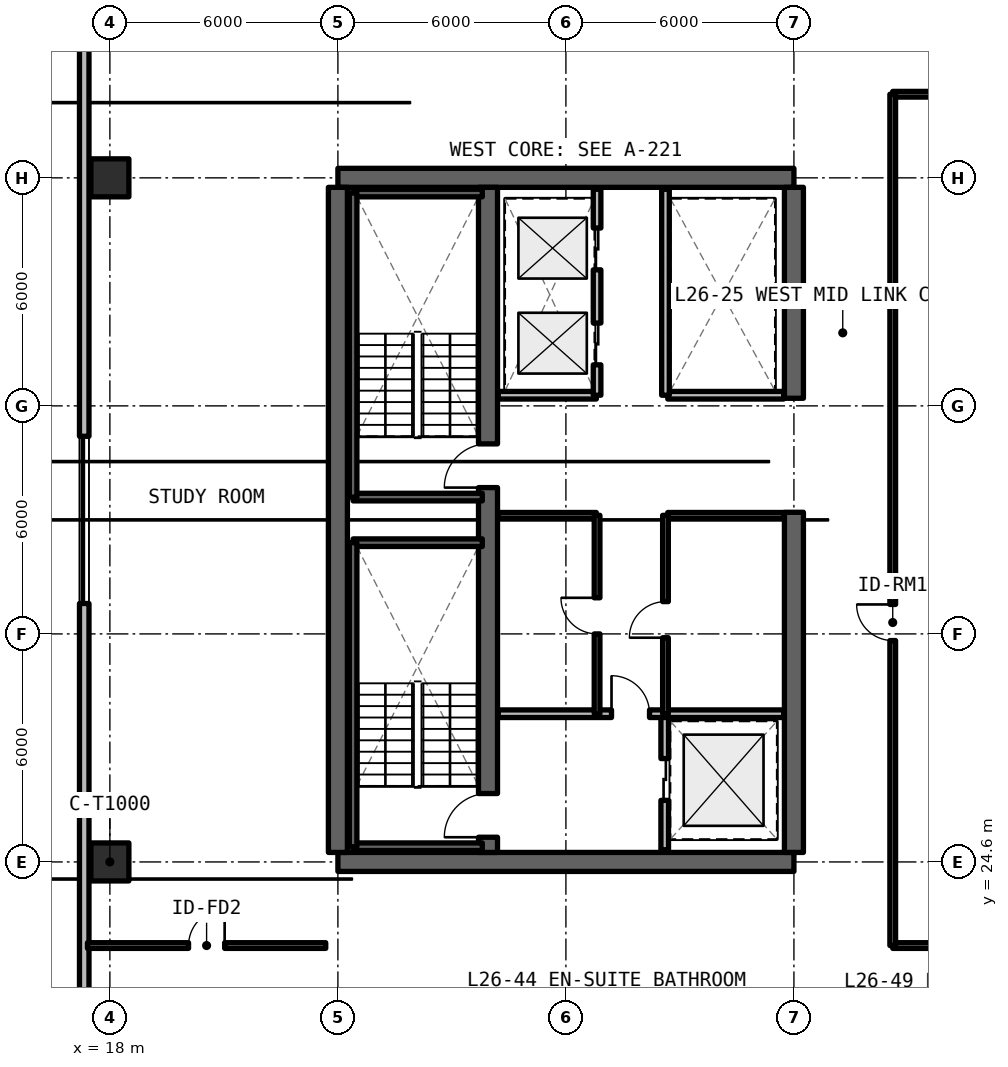
"""IFC4 building model, lengths in metres.
Left out: names, types, materials, properties, quantities, classifications, styles, units other than length and angle.
Written with IfcOpenShell. Run it as: python <this file> out.ifc"""

import sys

from ifc_helpers import new_model, si_unit, direction, frame, frame_2d, origin, origin_2d, place, context, subcontext, project, spatial, rectangle, extrude, element, fill, save


model = new_model("IFC4")
c1 = context("Model", 3, precision=1e-05, world=origin(), true_north=direction((0.0, 1.0)))
c2 = subcontext(c1, "Body", "Model", "MODEL_VIEW")
j1 = project(units=[si_unit("LENGTHUNIT", "METRE"), si_unit("PLANEANGLEUNIT", "RADIAN")], contexts=[c1])
p1 = place(None, origin())
s1 = spatial("IfcSite", under=j1, at=p1, CompositionType="ELEMENT")
p2 = place(p1, origin())
s2 = spatial("IfcBuilding", under=s1, at=p2, CompositionType="ELEMENT")
p3 = place(p2, frame((0.0, 0.0, 95.37)))
s3 = spatial("IfcBuildingStorey", under=s2, at=p3, CompositionType="ELEMENT", Elevation=95.37)
for number, where, z_axis, x_axis in (
    (1, (24.0, 24.6, 0.0), (0.0, 0.0, 1.0), (1.0, 0.0, 0.0)),
    (2, (36.0, 42.6, 0.0), (0.0, 0.0, 1.0), (-1.0, 0.0, 0.0)),
):
    element("IfcWall", number, at=place(p3, frame(where, z_axis=z_axis, x_axis=x_axis)), inside=s3, PredefinedType="SHEAR", context=c2, shape_type="SweptSolid", body=[
        extrude(rectangle(XDim=12.0, YDim=0.5, at=frame_2d((6.0, 0.0))), origin(), (0.0, 0.0, 1.0), 3.3),
    ])
p4 = place(p3, frame((24.0, 24.85, 0.0), z_axis=(0.0, 0.0, 1.0), x_axis=(0.0, 1.0, 0.0)))
e3 = element("IfcWall", 3, at=p4, inside=s3, PredefinedType="SHEAR", context=c2, shape_type="SweptSolid", body=[
    extrude(rectangle(XDim=17.5, YDim=0.5, at=frame_2d((8.75, 0.0))), origin(), (0.0, 0.0, 1.0), 3.3),
])
p5 = place(p3, frame((36.0, 24.85, 0.0), z_axis=(0.0, 0.0, 1.0), x_axis=(0.0, 1.0, 0.0)))
e4 = element("IfcWall", 4, at=p5, inside=s3, PredefinedType="SHEAR", context=c2, shape_type="SweptSolid", body=[
    extrude(rectangle(XDim=8.95, YDim=0.5, at=frame_2d((4.475, 0.0))), origin(), (0.0, 0.0, 1.0), 3.3),
])
p6 = place(p3, frame((36.0, 36.8, 0.0), z_axis=(0.0, 0.0, 1.0), x_axis=(0.0, 1.0, 0.0)))
e5 = element("IfcWall", 5, at=p6, inside=s3, PredefinedType="SHEAR", context=c2, shape_type="SweptSolid", body=[
    extrude(rectangle(XDim=5.55, YDim=0.5, at=frame_2d((2.775, 0.0))), origin(), (0.0, 0.0, 1.0), 3.3),
])
p7 = place(p3, frame((27.95, 24.85, 0.0), z_axis=(0.0, 0.0, 1.0), x_axis=(0.0, 1.0, 0.0)))
e6 = element("IfcWall", 6, at=p7, inside=s3, PredefinedType="SHEAR", context=c2, shape_type="SweptSolid", body=[
    extrude(rectangle(XDim=17.5, YDim=0.5, at=frame_2d((8.75, 0.0))), origin(), (0.0, 0.0, 1.0), 3.3),
])
p8 = place(p7, frame((0.4, 0.0, 0.0)))
e7 = element("IfcOpeningElement", 7, at=p8, cuts=e6, PredefinedType="OPENING", context=c2, shape_type="SweptSolid", body=[
    extrude(rectangle(XDim=1.15, YDim=2.15, at=frame_2d((0.575, 1.075))), frame((0.0, 0.26, 0.0), z_axis=(0.0, -1.0, 0.0), x_axis=(1.0, 0.0, 0.0)), (0.0, 0.0, 1.0), 0.52),
])
p9 = place(p7, frame((9.6, 0.0, 0.0)))
e8 = element("IfcOpeningElement", 8, at=p9, cuts=e6, PredefinedType="OPENING", context=c2, shape_type="SweptSolid", body=[
    extrude(rectangle(XDim=1.15, YDim=2.15, at=frame_2d((0.575, 1.075))), frame((0.0, 0.26, 0.0), z_axis=(0.0, -1.0, 0.0), x_axis=(1.0, 0.0, 0.0)), (0.0, 0.0, 1.0), 0.52),
])
for number, where, z_axis, x_axis in (
    (9, (18.0, 24.6, 0.0), (0.0, 0.0, 1.0), (1.0, 0.0, 0.0)),
    (10, (18.0, 42.6, 0.0), (0.0, 0.0, 1.0), (1.0, 0.0, 0.0)),
):
    element("IfcColumn", number, at=place(p3, frame(where, z_axis=z_axis, x_axis=x_axis)), inside=s3, PredefinedType="COLUMN", context=c2, shape_type="SweptSolid", body=[
        extrude(rectangle(XDim=1.0, YDim=1.0, at=origin_2d()), origin(), (0.0, 0.0, 1.0), 3.3),
    ])
p10 = place(p3, frame((17.325, 53.348, 0.0), z_axis=(0.0, 0.0, 1.0), x_axis=(0.0, -1.0, 0.0)))
e11 = element("IfcWall", 11, at=p10, inside=s3, PredefinedType="SOLIDWALL", context=c2, shape_type="SweptSolid", body=[
    extrude(rectangle(XDim=39.496, YDim=0.25, at=frame_2d((19.748, 0.0))), origin(), (0.0, 0.0, 1.0), 3.08),
])
p11 = place(p10, frame((36.448, 0.0, 0.0)))
e12 = element("IfcOpeningElement", 12, at=p11, cuts=e11, PredefinedType="OPENING", context=c2, shape_type="SweptSolid", body=[
    extrude(rectangle(XDim=1.1, YDim=2.15, at=frame_2d((0.55, 1.075))), frame((0.0, 0.135, 0.0), z_axis=(0.0, -1.0, 0.0), x_axis=(1.0, 0.0, 0.0)), (0.0, 0.0, 1.0), 0.27),
])
p12 = place(p10, frame((17.548, 0.0, 0.78)))
e13 = element("IfcOpeningElement", 13, at=p12, cuts=e11, PredefinedType="OPENING", context=c2, shape_type="SweptSolid", body=[
    extrude(rectangle(XDim=4.4, YDim=1.66, at=frame_2d((2.2, 0.83))), frame((0.0, 0.135, 0.0), z_axis=(0.0, -1.0, 0.0), x_axis=(1.0, 0.0, 0.0)), (0.0, 0.0, 1.0), 0.27),
])
p13 = place(p3, frame((32.6, 24.92, 0.0), z_axis=(0.0, 0.0, 1.0), x_axis=(0.0, 1.0, 0.0)))
e14 = element("IfcWall", 14, at=p13, inside=s3, PredefinedType="SOLIDWALL", context=c2, shape_type="SweptSolid", body=[
    extrude(rectangle(XDim=3.58, YDim=0.2, at=frame_2d((1.79, 0.0))), origin(), (0.0, 0.0, 1.0), 2.35),
])
p14 = place(p13, frame((1.3, 0.0, 0.0)))
e15 = element("IfcOpeningElement", 15, at=p14, cuts=e14, PredefinedType="OPENING", context=c2, shape_type="SweptSolid", body=[
    extrude(rectangle(XDim=1.1, YDim=2.2, at=frame_2d((0.55, 1.1))), frame((0.0, 0.11, 0.0), z_axis=(0.0, -1.0, 0.0), x_axis=(1.0, 0.0, 0.0)), (0.0, 0.0, 1.0), 0.22),
])
p15 = place(p3, frame((28.22, 28.5, 0.0), z_axis=(0.0, 0.0, 1.0), x_axis=(1.0, 0.0, 0.0)))
e16 = element("IfcWall", 16, at=p15, inside=s3, PredefinedType="SOLIDWALL", context=c2, shape_type="SweptSolid", body=[
    extrude(rectangle(XDim=7.51, YDim=0.2, at=frame_2d((3.755, 0.0))), origin(), (0.0, 0.0, 1.0), 2.35),
])
p16 = place(p15, frame((2.98, 0.0, 0.0)))
e17 = element("IfcOpeningElement", 17, at=p16, cuts=e16, PredefinedType="OPENING", context=c2, shape_type="SweptSolid", body=[
    extrude(rectangle(XDim=1.0, YDim=2.15, at=frame_2d((0.5, 1.075))), frame((0.0, 0.11, 0.0), z_axis=(0.0, -1.0, 0.0), x_axis=(1.0, 0.0, 0.0)), (0.0, 0.0, 1.0), 0.22),
])
p17 = place(p3, frame((28.22, 33.72, 0.0), z_axis=(0.0, 0.0, 1.0), x_axis=(1.0, 0.0, 0.0)))
e18 = element("IfcWall", 18, at=p17, inside=s3, PredefinedType="SOLIDWALL", context=c2, shape_type="SweptSolid", body=[
    extrude(rectangle(XDim=2.58, YDim=0.15, at=frame_2d((1.29, 0.0))), origin(), (0.0, 0.0, 1.0), 2.35),
])
p18 = place(p3, frame((30.82, 28.5, 0.0), z_axis=(0.0, 0.0, 1.0), x_axis=(0.0, 1.0, 0.0)))
e19 = element("IfcWall", 19, at=p18, inside=s3, PredefinedType="SOLIDWALL", context=c2, shape_type="SweptSolid", body=[
    extrude(rectangle(XDim=5.22, YDim=0.15, at=frame_2d((2.61, 0.0))), origin(), (0.0, 0.0, 1.0), 2.35),
])
p19 = place(p18, frame((2.1, 0.0, 0.0)))
e20 = element("IfcOpeningElement", 20, at=p19, cuts=e19, PredefinedType="OPENING", context=c2, shape_type="SweptSolid", body=[
    extrude(rectangle(XDim=0.95, YDim=2.15, at=frame_2d((0.475, 1.075))), frame((0.0, 0.085, 0.0), z_axis=(0.0, -1.0, 0.0), x_axis=(1.0, 0.0, 0.0)), (0.0, 0.0, 1.0), 0.17),
])
p20 = place(p3, frame((32.68, 33.72, 0.0), z_axis=(0.0, 0.0, 1.0), x_axis=(1.0, 0.0, 0.0)))
e21 = element("IfcWall", 21, at=p20, inside=s3, PredefinedType="SOLIDWALL", context=c2, shape_type="SweptSolid", body=[
    extrude(rectangle(XDim=3.05, YDim=0.15, at=frame_2d((1.525, 0.0))), origin(), (0.0, 0.0, 1.0), 2.35),
])
p21 = place(p3, frame((32.62, 28.5, 0.0), z_axis=(0.0, 0.0, 1.0), x_axis=(0.0, 1.0, 0.0)))
e22 = element("IfcWall", 22, at=p21, inside=s3, PredefinedType="SOLIDWALL", context=c2, shape_type="SweptSolid", body=[
    extrude(rectangle(XDim=5.22, YDim=0.15, at=frame_2d((2.61, 0.0))), origin(), (0.0, 0.0, 1.0), 2.35),
])
p22 = place(p21, frame((2.0, 0.0, 0.0)))
e23 = element("IfcOpeningElement", 23, at=p22, cuts=e22, PredefinedType="OPENING", context=c2, shape_type="SweptSolid", body=[
    extrude(rectangle(XDim=0.95, YDim=2.15, at=frame_2d((0.475, 1.075))), frame((0.0, 0.085, 0.0), z_axis=(0.0, -1.0, 0.0), x_axis=(1.0, 0.0, 0.0)), (0.0, 0.0, 1.0), 0.17),
])
p23 = place(p3, frame((28.22, 36.88, 0.0), z_axis=(0.0, 0.0, 1.0), x_axis=(1.0, 0.0, 0.0)))
e24 = element("IfcWall", 24, at=p23, inside=s3, PredefinedType="SOLIDWALL", context=c2, shape_type="SweptSolid", body=[
    extrude(rectangle(XDim=2.58, YDim=0.2, at=frame_2d((1.29, 0.0))), origin(), (0.0, 0.0, 1.0), 2.35),
])
p24 = place(p3, frame((30.82, 36.88, 0.0), z_axis=(0.0, 0.0, 1.0), x_axis=(0.0, 1.0, 0.0)))
e25 = element("IfcWall", 25, at=p24, inside=s3, PredefinedType="SOLIDWALL", context=c2, shape_type="SweptSolid", body=[
    extrude(rectangle(XDim=5.42, YDim=0.2, at=frame_2d((2.71, 0.0))), origin(), (0.0, 0.0, 1.0), 2.35),
])
p25 = place(p24, frame((0.8, 0.0, 0.0)))
e26 = element("IfcOpeningElement", 26, at=p25, cuts=e25, PredefinedType="OPENING", context=c2, shape_type="SweptSolid", body=[
    extrude(rectangle(XDim=1.1, YDim=2.2, at=frame_2d((0.55, 1.1))), frame((0.0, 0.11, 0.0), z_axis=(0.0, -1.0, 0.0), x_axis=(1.0, 0.0, 0.0)), (0.0, 0.0, 1.0), 0.22),
])
p26 = place(p24, frame((3.3, 0.0, 0.0)))
e27 = element("IfcOpeningElement", 27, at=p26, cuts=e25, PredefinedType="OPENING", context=c2, shape_type="SweptSolid", body=[
    extrude(rectangle(XDim=1.1, YDim=2.2, at=frame_2d((0.55, 1.1))), frame((0.0, 0.11, 0.0), z_axis=(0.0, -1.0, 0.0), x_axis=(1.0, 0.0, 0.0)), (0.0, 0.0, 1.0), 0.22),
])
p27 = place(p3, frame((32.68, 36.88, 0.0), z_axis=(0.0, 0.0, 1.0), x_axis=(1.0, 0.0, 0.0)))
e28 = element("IfcWall", 28, at=p27, inside=s3, PredefinedType="SOLIDWALL", context=c2, shape_type="SweptSolid", body=[
    extrude(rectangle(XDim=3.05, YDim=0.2, at=frame_2d((1.525, 0.0))), origin(), (0.0, 0.0, 1.0), 2.35),
])
p28 = place(p3, frame((32.62, 36.88, 0.0), z_axis=(0.0, 0.0, 1.0), x_axis=(0.0, 1.0, 0.0)))
e29 = element("IfcWall", 29, at=p28, inside=s3, PredefinedType="SOLIDWALL", context=c2, shape_type="SweptSolid", body=[
    extrude(rectangle(XDim=5.42, YDim=0.2, at=frame_2d((2.71, 0.0))), origin(), (0.0, 0.0, 1.0), 2.35),
])
for number, where, z_axis, x_axis in (
    (30, (38.6, 22.4, 0.0), (0.0, 0.0, 1.0), (1.0, 0.0, 0.0)),
    (31, (38.6, 44.8, 0.0), (0.0, 0.0, 1.0), (1.0, 0.0, 0.0)),
):
    element("IfcWall", number, at=place(p3, frame(where, z_axis=z_axis, x_axis=x_axis)), inside=s3, PredefinedType="SOLIDWALL", context=c2, shape_type="SweptSolid", body=[
        extrude(rectangle(XDim=8.25, YDim=0.15, at=frame_2d((4.125, 0.0))), origin(), (0.0, 0.0, 1.0), 2.35),
    ])
p29 = place(p3, frame((38.6, 22.4, 0.0), z_axis=(0.0, 0.0, 1.0), x_axis=(0.0, 1.0, 0.0)))
e32 = element("IfcWall", 32, at=p29, inside=s3, PredefinedType="SOLIDWALL", context=c2, shape_type="SweptSolid", body=[
    extrude(rectangle(XDim=22.4, YDim=0.15, at=frame_2d((11.2, 0.0))), origin(), (0.0, 0.0, 1.0), 2.35),
])
p30 = place(p29, frame((8.025, 0.0, 0.0)))
e33 = element("IfcOpeningElement", 33, at=p30, cuts=e32, PredefinedType="OPENING", context=c2, shape_type="SweptSolid", body=[
    extrude(rectangle(XDim=0.95, YDim=2.15, at=frame_2d((0.475, 1.075))), frame((0.0, 0.085, 0.0), z_axis=(0.0, -1.0, 0.0), x_axis=(1.0, 0.0, 0.0)), (0.0, 0.0, 1.0), 0.17),
])
p31 = place(p3, frame((17.41, 22.4, 0.0), z_axis=(0.0, 0.0, 1.0), x_axis=(1.0, 0.0, 0.0)))
e34 = element("IfcWall", 34, at=p31, inside=s3, PredefinedType="SOLIDWALL", context=c2, shape_type="SweptSolid", body=[
    extrude(rectangle(XDim=6.27, YDim=0.15, at=frame_2d((3.135, 0.0))), origin(), (0.0, 0.0, 1.0), 2.35),
])
p32 = place(p31, frame((2.66, 0.0, 0.0)))
e35 = element("IfcOpeningElement", 35, at=p32, cuts=e34, PredefinedType="OPENING", context=c2, shape_type="SweptSolid", body=[
    extrude(rectangle(XDim=0.95, YDim=2.15, at=frame_2d((0.475, 1.075))), frame((0.0, 0.085, 0.0), z_axis=(0.0, -1.0, 0.0), x_axis=(1.0, 0.0, 0.0)), (0.0, 0.0, 1.0), 0.17),
])
for number, where, z_axis, x_axis in (
    (36, (24.4, 25.0, 0.0), (0.0, 0.0, 1.0), (1.0, 0.0, 0.0)),
    (37, (27.8, 33.0, 0.0), (0.0, 0.0, 1.0), (-1.0, 0.0, 0.0)),
):
    element("IfcWall", number, at=place(p3, frame(where, z_axis=z_axis, x_axis=x_axis)), inside=s3, PredefinedType="SOLIDWALL", context=c2, shape_type="SweptSolid", body=[
        extrude(rectangle(XDim=3.4, YDim=0.2, at=frame_2d((1.7, 0.0))), origin(), (0.0, 0.0, 1.0), 3.3),
    ])
p33 = place(p3, frame((24.4, 33.0, 0.0), z_axis=(0.0, 0.0, 1.0), x_axis=(0.0, -1.0, 0.0)))
e38 = element("IfcWall", 38, at=p33, inside=s3, PredefinedType="SOLIDWALL", context=c2, shape_type="SweptSolid", body=[
    extrude(rectangle(XDim=8.0, YDim=0.2, at=frame_2d((4.0, 0.0))), origin(), (0.0, 0.0, 1.0), 3.3),
])
for number, where, z_axis, x_axis in (
    (39, (24.4, 34.2, 0.0), (0.0, 0.0, 1.0), (1.0, 0.0, 0.0)),
    (40, (27.8, 42.2, 0.0), (0.0, 0.0, 1.0), (-1.0, 0.0, 0.0)),
):
    element("IfcWall", number, at=place(p3, frame(where, z_axis=z_axis, x_axis=x_axis)), inside=s3, PredefinedType="SOLIDWALL", context=c2, shape_type="SweptSolid", body=[
        extrude(rectangle(XDim=3.4, YDim=0.2, at=frame_2d((1.7, 0.0))), origin(), (0.0, 0.0, 1.0), 3.3),
    ])
p34 = place(p3, frame((24.4, 42.2, 0.0), z_axis=(0.0, 0.0, 1.0), x_axis=(0.0, -1.0, 0.0)))
e41 = element("IfcWall", 41, at=p34, inside=s3, PredefinedType="SOLIDWALL", context=c2, shape_type="SweptSolid", body=[
    extrude(rectangle(XDim=8.0, YDim=0.2, at=frame_2d((4.0, 0.0))), origin(), (0.0, 0.0, 1.0), 3.3),
])
p35 = place(p12, origin())
e42 = element("IfcWindow", 42, at=p35, inside=s3, PartitioningType="SINGLE_PANEL", PredefinedType="WINDOW", context=c2, shape_type="SweptSolid", body=[
    extrude(rectangle(XDim=4.4, YDim=1.66, at=frame_2d((2.2, 0.83))), frame((0.0, 0.03, 0.0), z_axis=(0.0, -1.0, 0.0), x_axis=(1.0, 0.0, 0.0)), (0.0, 0.0, 1.0), 0.06),
])
fill(e13, e42)
p36 = place(p14, origin())
e43 = element("IfcDoor", 43, at=p36, inside=s3, OperationType="SLIDING_TO_LEFT", PredefinedType="DOOR", context=c2, shape_type="SweptSolid", body=[
    extrude(rectangle(XDim=1.1, YDim=2.2, at=frame_2d((0.55, 1.1))), frame((0.0, 0.025, 0.0), z_axis=(0.0, -1.0, 0.0), x_axis=(1.0, 0.0, 0.0)), (0.0, 0.0, 1.0), 0.05),
])
fill(e15, e43)
p37 = place(p16, origin())
e44 = element("IfcDoor", 44, at=p37, inside=s3, OperationType="SINGLE_SWING_LEFT", PredefinedType="DOOR", context=c2, shape_type="SweptSolid", body=[
    extrude(rectangle(XDim=1.0, YDim=2.15, at=frame_2d((0.5, 1.075))), frame((0.0, 0.025, 0.0), z_axis=(0.0, -1.0, 0.0), x_axis=(1.0, 0.0, 0.0)), (0.0, 0.0, 1.0), 0.05),
])
fill(e17, e44)
p38 = place(p19, origin())
e45 = element("IfcDoor", 45, at=p38, inside=s3, OperationType="SINGLE_SWING_RIGHT", PredefinedType="DOOR", context=c2, shape_type="SweptSolid", body=[
    extrude(rectangle(XDim=0.95, YDim=2.15, at=frame_2d((0.475, 1.075))), frame((0.0, 0.025, 0.0), z_axis=(0.0, -1.0, 0.0), x_axis=(1.0, 0.0, 0.0)), (0.0, 0.0, 1.0), 0.05),
])
fill(e20, e45)
p39 = place(p22, origin())
e46 = element("IfcDoor", 46, at=p39, inside=s3, OperationType="SINGLE_SWING_LEFT", PredefinedType="DOOR", context=c2, shape_type="SweptSolid", body=[
    extrude(rectangle(XDim=0.95, YDim=2.15, at=frame_2d((0.475, 1.075))), frame((0.0, 0.025, 0.0), z_axis=(0.0, -1.0, 0.0), x_axis=(1.0, 0.0, 0.0)), (0.0, 0.0, 1.0), 0.05),
])
fill(e23, e46)
p40 = place(p25, origin())
e47 = element("IfcDoor", 47, at=p40, inside=s3, OperationType="SLIDING_TO_LEFT", PredefinedType="DOOR", context=c2, shape_type="SweptSolid", body=[
    extrude(rectangle(XDim=1.1, YDim=2.2, at=frame_2d((0.55, 1.1))), frame((0.0, 0.025, 0.0), z_axis=(0.0, -1.0, 0.0), x_axis=(1.0, 0.0, 0.0)), (0.0, 0.0, 1.0), 0.05),
])
fill(e26, e47)
p41 = place(p26, origin())
e48 = element("IfcDoor", 48, at=p41, inside=s3, OperationType="SLIDING_TO_RIGHT", PredefinedType="DOOR", context=c2, shape_type="SweptSolid", body=[
    extrude(rectangle(XDim=1.1, YDim=2.2, at=frame_2d((0.55, 1.1))), frame((0.0, 0.025, 0.0), z_axis=(0.0, -1.0, 0.0), x_axis=(1.0, 0.0, 0.0)), (0.0, 0.0, 1.0), 0.05),
])
fill(e27, e48)
p42 = place(p30, origin())
e49 = element("IfcDoor", 49, at=p42, inside=s3, OperationType="SINGLE_SWING_RIGHT", PredefinedType="DOOR", context=c2, shape_type="SweptSolid", body=[
    extrude(rectangle(XDim=0.95, YDim=2.15, at=frame_2d((0.475, 1.075))), frame((0.0, 0.025, 0.0), z_axis=(0.0, -1.0, 0.0), x_axis=(1.0, 0.0, 0.0)), (0.0, 0.0, 1.0), 0.05),
])
fill(e33, e49)
p43 = place(p32, origin())
e50 = element("IfcDoor", 50, at=p43, inside=s3, OperationType="SINGLE_SWING_RIGHT", PredefinedType="DOOR", context=c2, shape_type="SweptSolid", body=[
    extrude(rectangle(XDim=0.95, YDim=2.15, at=frame_2d((0.475, 1.075))), frame((0.0, 0.025, 0.0), z_axis=(0.0, -1.0, 0.0), x_axis=(1.0, 0.0, 0.0)), (0.0, 0.0, 1.0), 0.05),
])
fill(e35, e50)
p44 = place(p8, origin())
e51 = element("IfcDoor", 51, at=p44, inside=s3, OperationType="SINGLE_SWING_LEFT", PredefinedType="DOOR", context=c2, shape_type="SweptSolid", body=[
    extrude(rectangle(XDim=1.15, YDim=2.15, at=frame_2d((0.575, 1.075))), frame((0.0, 0.025, 0.0), z_axis=(0.0, -1.0, 0.0), x_axis=(1.0, 0.0, 0.0)), (0.0, 0.0, 1.0), 0.05),
])
fill(e7, e51)
p45 = place(p9, origin())
e52 = element("IfcDoor", 52, at=p45, inside=s3, OperationType="SINGLE_SWING_RIGHT", PredefinedType="DOOR", context=c2, shape_type="SweptSolid", body=[
    extrude(rectangle(XDim=1.15, YDim=2.15, at=frame_2d((0.575, 1.075))), frame((0.0, 0.025, 0.0), z_axis=(0.0, -1.0, 0.0), x_axis=(1.0, 0.0, 0.0)), (0.0, 0.0, 1.0), 0.05),
])
fill(e8, e52)
save(model, sys.argv[1])
